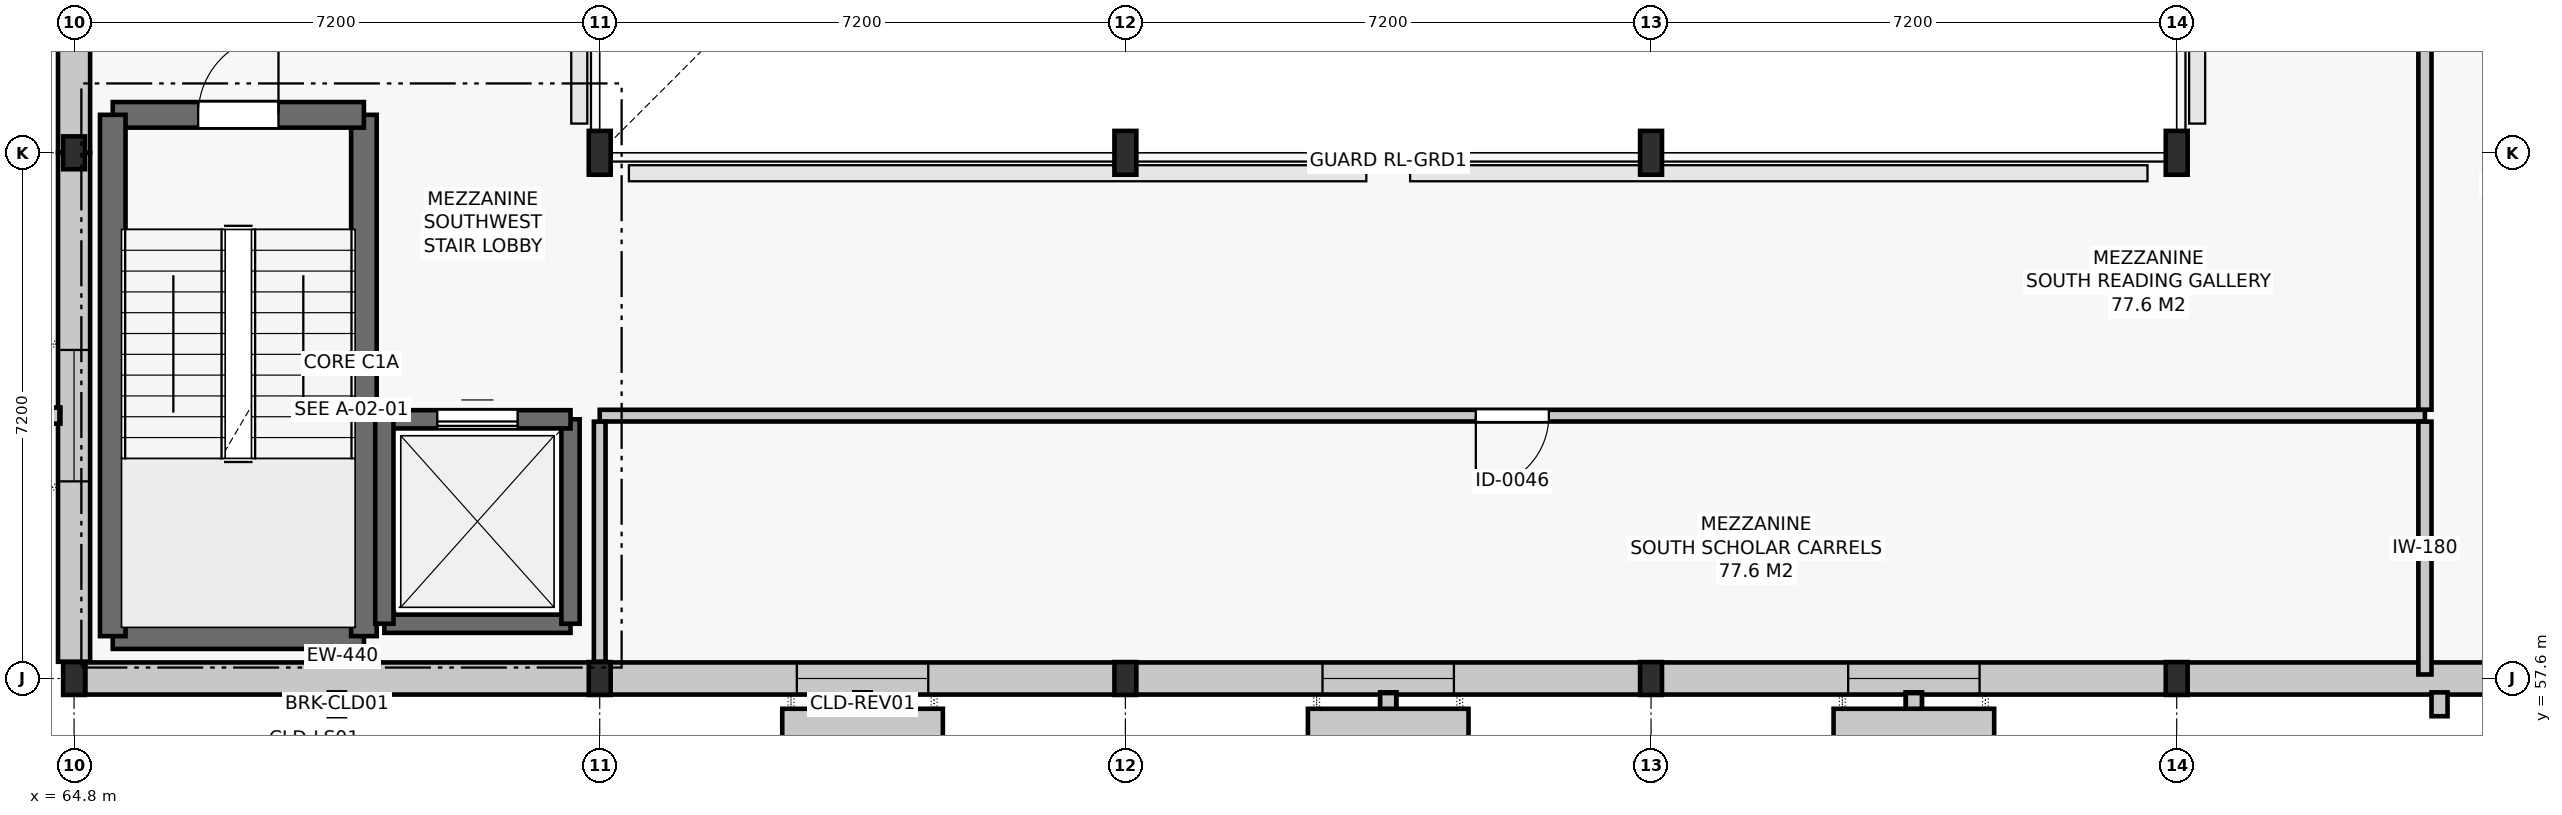
"""IFC4 building model, lengths in metres.
Left out: names, types, materials, properties, quantities, classifications, styles, units other than length and angle.
Written with IfcOpenShell. Run it as: python <this file> out.ifc"""

import sys

from ifc_helpers import new_model, si_unit, direction, frame, frame_2d, origin, origin_2d, place, context, subcontext, project, spatial, rectangle, i_section, extrude, element, fill, save


model = new_model("IFC4")
c1 = context("Model", 3, precision=1e-05, world=origin(), true_north=direction((0.0, 1.0)))
c2 = subcontext(c1, "Body", "Model", "MODEL_VIEW")
j1 = project(units=[si_unit("LENGTHUNIT", "METRE"), si_unit("PLANEANGLEUNIT", "RADIAN")], contexts=[c1])
p1 = place(None, origin())
s1 = spatial("IfcSite", under=j1, at=p1, CompositionType="ELEMENT")
p2 = place(p1, origin())
s2 = spatial("IfcBuilding", under=s1, at=p2, CompositionType="ELEMENT")
p3 = place(p2, frame((0.0, 0.0, 10.2)))
s3 = spatial("IfcBuildingStorey", under=s2, at=p3, CompositionType="ELEMENT", Elevation=10.2)
for number, where, z_axis, x_axis in (
    (1, (64.8, 57.6, 0.0), (0.0, 0.0, 1.0), (1.0, 0.0, 0.0)),
    (2, (64.8, 64.8, 0.0), (0.0, 0.0, 1.0), (1.0, 0.0, 0.0)),
    (3, (72.0, 57.6, 0.0), (0.0, 0.0, 1.0), (1.0, 0.0, 0.0)),
):
    element("IfcColumn", number, at=place(p3, frame(where, z_axis=z_axis, x_axis=x_axis)), inside=s3, PredefinedType="COLUMN", context=c2, shape_type="SweptSolid", body=[
        extrude(i_section(OverallWidth=0.3, OverallDepth=0.45, WebThickness=0.014, FlangeThickness=0.026, FilletRadius=0.027, at=origin_2d()), origin(), (0.0, 0.0, 1.0), 4.2),
    ])
p4 = place(p3, frame((72.0, 64.8, 0.0), z_axis=(0.0, 0.0, 1.0), x_axis=(1.0, 0.0, 0.0)))
e4 = element("IfcColumn", 4, at=p4, inside=s3, PredefinedType="COLUMN", context=c2, shape_type="SweptSolid", body=[
    extrude(i_section(OverallWidth=0.3, OverallDepth=0.6, WebThickness=0.015, FlangeThickness=0.03, FilletRadius=0.027, at=origin_2d()), origin(), (0.0, 0.0, 1.0), 4.2),
])
p5 = place(p3, frame((79.2, 57.6, 0.0), z_axis=(0.0, 0.0, 1.0), x_axis=(1.0, 0.0, 0.0)))
e5 = element("IfcColumn", 5, at=p5, inside=s3, PredefinedType="COLUMN", context=c2, shape_type="SweptSolid", body=[
    extrude(i_section(OverallWidth=0.3, OverallDepth=0.45, WebThickness=0.014, FlangeThickness=0.026, FilletRadius=0.027, at=origin_2d()), origin(), (0.0, 0.0, 1.0), 4.2),
])
p6 = place(p3, frame((79.2, 64.8, 0.0), z_axis=(0.0, 0.0, 1.0), x_axis=(1.0, 0.0, 0.0)))
e6 = element("IfcColumn", 6, at=p6, inside=s3, PredefinedType="COLUMN", context=c2, shape_type="SweptSolid", body=[
    extrude(i_section(OverallWidth=0.3, OverallDepth=0.6, WebThickness=0.015, FlangeThickness=0.03, FilletRadius=0.027, at=origin_2d()), origin(), (0.0, 0.0, 1.0), 4.2),
])
p7 = place(p3, frame((86.4, 57.6, 0.0), z_axis=(0.0, 0.0, 1.0), x_axis=(1.0, 0.0, 0.0)))
e7 = element("IfcColumn", 7, at=p7, inside=s3, PredefinedType="COLUMN", context=c2, shape_type="SweptSolid", body=[
    extrude(i_section(OverallWidth=0.3, OverallDepth=0.45, WebThickness=0.014, FlangeThickness=0.026, FilletRadius=0.027, at=origin_2d()), origin(), (0.0, 0.0, 1.0), 4.2),
])
p8 = place(p3, frame((86.4, 64.8, 0.0), z_axis=(0.0, 0.0, 1.0), x_axis=(1.0, 0.0, 0.0)))
e8 = element("IfcColumn", 8, at=p8, inside=s3, PredefinedType="COLUMN", context=c2, shape_type="SweptSolid", body=[
    extrude(i_section(OverallWidth=0.3, OverallDepth=0.6, WebThickness=0.015, FlangeThickness=0.03, FilletRadius=0.027, at=origin_2d()), origin(), (0.0, 0.0, 1.0), 4.2),
])
p9 = place(p3, frame((93.6, 57.6, 0.0), z_axis=(0.0, 0.0, 1.0), x_axis=(1.0, 0.0, 0.0)))
e9 = element("IfcColumn", 9, at=p9, inside=s3, PredefinedType="COLUMN", context=c2, shape_type="SweptSolid", body=[
    extrude(i_section(OverallWidth=0.3, OverallDepth=0.45, WebThickness=0.014, FlangeThickness=0.026, FilletRadius=0.027, at=origin_2d()), origin(), (0.0, 0.0, 1.0), 4.2),
])
p10 = place(p3, frame((93.6, 64.8, 0.0), z_axis=(0.0, 0.0, 1.0), x_axis=(1.0, 0.0, 0.0)))
e10 = element("IfcColumn", 10, at=p10, inside=s3, PredefinedType="COLUMN", context=c2, shape_type="SweptSolid", body=[
    extrude(i_section(OverallWidth=0.3, OverallDepth=0.6, WebThickness=0.015, FlangeThickness=0.03, FilletRadius=0.027, at=origin_2d()), origin(), (0.0, 0.0, 1.0), 4.2),
])
p11 = place(p3, frame((64.954, 57.6, 0.0), z_axis=(0.0, 0.0, 1.0), x_axis=(1.0, 0.0, 0.0)))
e11 = element("IfcWall", 11, at=p11, inside=s3, PredefinedType="SOLIDWALL", context=c2, shape_type="SweptSolid", body=[
    extrude(rectangle(XDim=7.046, YDim=0.44, at=frame_2d((3.523, 0.0))), origin(), (0.0, 0.0, 1.0), 3.2),
])
p12 = place(p3, frame((72.0, 57.6, 0.0), z_axis=(0.0, 0.0, 1.0), x_axis=(1.0, 0.0, 0.0)))
e12 = element("IfcWall", 12, at=p12, inside=s3, PredefinedType="SOLIDWALL", context=c2, shape_type="SweptSolid", body=[
    extrude(rectangle(XDim=7.2, YDim=0.44, at=frame_2d((3.6, 0.0))), origin(), (0.0, 0.0, 1.0), 3.2),
])
p13 = place(p12, frame((2.7, 0.0, 0.95)))
e13 = element("IfcOpeningElement", 13, at=p13, cuts=e12, PredefinedType="OPENING", context=c2, shape_type="SweptSolid", body=[
    extrude(rectangle(XDim=1.8, YDim=2.05, at=frame_2d((0.9, 1.025))), frame((0.0, 0.232, 0.0), z_axis=(0.0, -1.0, 0.0), x_axis=(1.0, 0.0, 0.0)), (0.0, 0.0, 1.0), 0.464),
])
p14 = place(p3, frame((79.2, 57.6, 0.0), z_axis=(0.0, 0.0, 1.0), x_axis=(1.0, 0.0, 0.0)))
e14 = element("IfcWall", 14, at=p14, inside=s3, PredefinedType="SOLIDWALL", context=c2, shape_type="SweptSolid", body=[
    extrude(rectangle(XDim=7.2, YDim=0.44, at=frame_2d((3.6, 0.0))), origin(), (0.0, 0.0, 1.0), 3.2),
])
p15 = place(p14, frame((2.7, 0.0, 0.95)))
e15 = element("IfcOpeningElement", 15, at=p15, cuts=e14, PredefinedType="OPENING", context=c2, shape_type="SweptSolid", body=[
    extrude(rectangle(XDim=1.8, YDim=2.05, at=frame_2d((0.9, 1.025))), frame((0.0, 0.232, 0.0), z_axis=(0.0, -1.0, 0.0), x_axis=(1.0, 0.0, 0.0)), (0.0, 0.0, 1.0), 0.464),
])
p16 = place(p3, frame((86.4, 57.6, 0.0), z_axis=(0.0, 0.0, 1.0), x_axis=(1.0, 0.0, 0.0)))
e16 = element("IfcWall", 16, at=p16, inside=s3, PredefinedType="SOLIDWALL", context=c2, shape_type="SweptSolid", body=[
    extrude(rectangle(XDim=7.2, YDim=0.44, at=frame_2d((3.6, 0.0))), origin(), (0.0, 0.0, 1.0), 3.2),
])
p17 = place(p16, frame((2.7, 0.0, 0.95)))
e17 = element("IfcOpeningElement", 17, at=p17, cuts=e16, PredefinedType="OPENING", context=c2, shape_type="SweptSolid", body=[
    extrude(rectangle(XDim=1.8, YDim=2.05, at=frame_2d((0.9, 1.025))), frame((0.0, 0.232, 0.0), z_axis=(0.0, -1.0, 0.0), x_axis=(1.0, 0.0, 0.0)), (0.0, 0.0, 1.0), 0.464),
])
p18 = place(p3, frame((93.6, 57.6, 0.0), z_axis=(0.0, 0.0, 1.0), x_axis=(1.0, 0.0, 0.0)))
e18 = element("IfcWall", 18, at=p18, inside=s3, PredefinedType="SOLIDWALL", context=c2, shape_type="SweptSolid", body=[
    extrude(rectangle(XDim=7.046, YDim=0.44, at=frame_2d((3.523, 0.0))), origin(), (0.0, 0.0, 1.0), 3.2),
])
p19 = place(p3, frame((64.8, 72.0, 0.0), z_axis=(0.0, 0.0, 1.0), x_axis=(0.0, -1.0, 0.0)))
e19 = element("IfcWall", 19, at=p19, inside=s3, PredefinedType="SOLIDWALL", context=c2, shape_type="SweptSolid", body=[
    extrude(rectangle(XDim=7.2, YDim=0.44, at=frame_2d((3.6, 0.0))), origin(), (0.0, 0.0, 1.0), 3.2),
])
p20 = place(p19, frame((2.7, 0.0, 0.95)))
e20 = element("IfcOpeningElement", 20, at=p20, cuts=e19, PredefinedType="OPENING", context=c2, shape_type="SweptSolid", body=[
    extrude(rectangle(XDim=1.8, YDim=2.05, at=frame_2d((0.9, 1.025))), frame((0.0, 0.232, 0.0), z_axis=(0.0, -1.0, 0.0), x_axis=(1.0, 0.0, 0.0)), (0.0, 0.0, 1.0), 0.464),
])
p21 = place(p3, frame((64.8, 64.8, 0.0), z_axis=(0.0, 0.0, 1.0), x_axis=(0.0, -1.0, 0.0)))
e21 = element("IfcWall", 21, at=p21, inside=s3, PredefinedType="SOLIDWALL", context=c2, shape_type="SweptSolid", body=[
    extrude(rectangle(XDim=6.971, YDim=0.44, at=frame_2d((3.485, 0.0))), origin(), (0.0, 0.0, 1.0), 3.2),
])
p22 = place(p21, frame((2.7, 0.0, 0.95)))
e22 = element("IfcOpeningElement", 22, at=p22, cuts=e21, PredefinedType="OPENING", context=c2, shape_type="SweptSolid", body=[
    extrude(rectangle(XDim=1.8, YDim=2.05, at=frame_2d((0.9, 1.025))), frame((0.0, 0.232, 0.0), z_axis=(0.0, -1.0, 0.0), x_axis=(1.0, 0.0, 0.0)), (0.0, 0.0, 1.0), 0.464),
])
p23 = place(p3, frame((65.33, 58.18, 0.0), z_axis=(0.0, 0.0, 1.0), x_axis=(1.0, 0.0, 0.0)))
e23 = element("IfcWall", 23, at=p23, inside=s3, PredefinedType="SHEAR", context=c2, shape_type="SweptSolid", body=[
    extrude(rectangle(XDim=3.44, YDim=0.35, at=frame_2d((1.72, 0.0))), origin(), (0.0, 0.0, 1.0), 3.92),
])
p24 = place(p3, frame((68.77, 58.18, 0.0), z_axis=(0.0, 0.0, 1.0), x_axis=(0.0, 1.0, 0.0)))
e24 = element("IfcWall", 24, at=p24, inside=s3, PredefinedType="SHEAR", context=c2, shape_type="SweptSolid", body=[
    extrude(rectangle(XDim=7.14, YDim=0.35, at=frame_2d((3.57, 0.0))), origin(), (0.0, 0.0, 1.0), 3.92),
])
p25 = place(p3, frame((68.77, 65.32, 0.0), z_axis=(0.0, 0.0, 1.0), x_axis=(-1.0, 0.0, 0.0)))
e25 = element("IfcWall", 25, at=p25, inside=s3, PredefinedType="SHEAR", context=c2, shape_type="SweptSolid", body=[
    extrude(rectangle(XDim=3.44, YDim=0.35, at=frame_2d((1.72, 0.0))), origin(), (0.0, 0.0, 1.0), 3.92),
])
p26 = place(p25, frame((1.17, 0.0, 0.0)))
e26 = element("IfcOpeningElement", 26, at=p26, cuts=e25, PredefinedType="OPENING", context=c2, shape_type="SweptSolid", body=[
    extrude(rectangle(XDim=1.1, YDim=2.15, at=frame_2d((0.55, 1.075))), frame((0.0, 0.187, 0.0), z_axis=(0.0, -1.0, 0.0), x_axis=(1.0, 0.0, 0.0)), (0.0, 0.0, 1.0), 0.374),
])
p27 = place(p3, frame((65.33, 65.32, 0.0), z_axis=(0.0, 0.0, 1.0), x_axis=(0.0, -1.0, 0.0)))
e27 = element("IfcWall", 27, at=p27, inside=s3, PredefinedType="SHEAR", context=c2, shape_type="SweptSolid", body=[
    extrude(rectangle(XDim=7.14, YDim=0.35, at=frame_2d((3.57, 0.0))), origin(), (0.0, 0.0, 1.0), 3.92),
])
p28 = place(p3, frame((69.05, 58.35, 0.0), z_axis=(0.0, 0.0, 1.0), x_axis=(1.0, 0.0, 0.0)))
e28 = element("IfcWall", 28, at=p28, inside=s3, PredefinedType="SHEAR", context=c2, shape_type="SweptSolid", body=[
    extrude(rectangle(XDim=2.55, YDim=0.25, at=frame_2d((1.275, 0.0))), origin(), (0.0, 0.0, 1.0), 3.92),
])
p29 = place(p3, frame((71.6, 58.35, 0.0), z_axis=(0.0, 0.0, 1.0), x_axis=(0.0, 1.0, 0.0)))
e29 = element("IfcWall", 29, at=p29, inside=s3, PredefinedType="SHEAR", context=c2, shape_type="SweptSolid", body=[
    extrude(rectangle(XDim=2.8, YDim=0.25, at=frame_2d((1.4, 0.0))), origin(), (0.0, 0.0, 1.0), 3.92),
])
p30 = place(p3, frame((71.6, 61.15, 0.0), z_axis=(0.0, 0.0, 1.0), x_axis=(-1.0, 0.0, 0.0)))
e30 = element("IfcWall", 30, at=p30, inside=s3, PredefinedType="SHEAR", context=c2, shape_type="SweptSolid", body=[
    extrude(rectangle(XDim=2.55, YDim=0.25, at=frame_2d((1.275, 0.0))), origin(), (0.0, 0.0, 1.0), 3.92),
])
p31 = place(p30, frame((0.725, 0.0, 0.0)))
e31 = element("IfcOpeningElement", 31, at=p31, cuts=e30, PredefinedType="OPENING", context=c2, shape_type="SweptSolid", body=[
    extrude(rectangle(XDim=1.1, YDim=2.1, at=frame_2d((0.55, 1.05))), frame((0.0, 0.137, 0.0), z_axis=(0.0, -1.0, 0.0), x_axis=(1.0, 0.0, 0.0)), (0.0, 0.0, 1.0), 0.274),
])
p32 = place(p3, frame((69.05, 61.15, 0.0), z_axis=(0.0, 0.0, 1.0), x_axis=(0.0, -1.0, 0.0)))
e32 = element("IfcWall", 32, at=p32, inside=s3, PredefinedType="SHEAR", context=c2, shape_type="SweptSolid", body=[
    extrude(rectangle(XDim=2.8, YDim=0.25, at=frame_2d((1.4, 0.0))), origin(), (0.0, 0.0, 1.0), 3.92),
])
p33 = place(p3, frame((72.0, 61.2, 0.0), z_axis=(0.0, 0.0, 1.0), x_axis=(1.0, 0.0, 0.0)))
e33 = element("IfcWall", 33, at=p33, inside=s3, PredefinedType="PARTITIONING", context=c2, shape_type="SweptSolid", body=[
    extrude(rectangle(XDim=25.0, YDim=0.16, at=frame_2d((12.5, 0.0))), origin(), (0.0, 0.0, 1.0), 3.541),
])
p34 = place(p33, frame((12.0, 0.0, 0.0)))
e34 = element("IfcOpeningElement", 34, at=p34, cuts=e33, PredefinedType="OPENING", context=c2, shape_type="SweptSolid", body=[
    extrude(rectangle(XDim=1.0, YDim=2.15, at=frame_2d((0.5, 1.075))), frame((0.0, 0.092, 0.0), z_axis=(0.0, -1.0, 0.0), x_axis=(1.0, 0.0, 0.0)), (0.0, 0.0, 1.0), 0.184),
])
p35 = place(p3, frame((97.0, 57.655, 0.0), z_axis=(0.0, 0.0, 1.0), x_axis=(0.0, 1.0, 0.0)))
e35 = element("IfcWall", 35, at=p35, inside=s3, PredefinedType="PARTITIONING", context=c2, shape_type="SweptSolid", body=[
    extrude(rectangle(XDim=3.463, YDim=0.18, at=frame_2d((1.731, 0.0))), origin(), (0.0, 0.0, 1.0), 3.355),
])
p36 = place(p3, frame((97.0, 61.282, 0.0), z_axis=(0.0, 0.0, 1.0), x_axis=(0.0, 1.0, 0.0)))
e36 = element("IfcWall", 36, at=p36, inside=s3, PredefinedType="PARTITIONING", context=c2, shape_type="SweptSolid", body=[
    extrude(rectangle(XDim=17.826, YDim=0.18, at=frame_2d((8.913, 0.0))), origin(), (0.0, 0.0, 1.0), 3.545),
])
p37 = place(p36, frame((9.727, 0.0, 0.0)))
e37 = element("IfcOpeningElement", 37, at=p37, cuts=e36, PredefinedType="OPENING", context=c2, shape_type="SweptSolid", body=[
    extrude(rectangle(XDim=1.65, YDim=2.25, at=frame_2d((0.825, 1.125))), frame((0.0, 0.102, 0.0), z_axis=(0.0, -1.0, 0.0), x_axis=(1.0, 0.0, 0.0)), (0.0, 0.0, 1.0), 0.204),
])
p38 = place(p3, frame((72.0, 57.829, 0.0), z_axis=(0.0, 0.0, 1.0), x_axis=(0.0, 1.0, 0.0)))
e38 = element("IfcWall", 38, at=p38, inside=s3, PredefinedType="PARTITIONING", context=c2, shape_type="SweptSolid", body=[
    extrude(rectangle(XDim=3.289, YDim=0.16, at=frame_2d((1.645, 0.0))), origin(), (0.0, 0.0, 1.0), 3.555),
])
p39 = place(p13, origin())
e39 = element("IfcWindow", 39, at=p39, inside=s3, PartitioningType="SINGLE_PANEL", PredefinedType="WINDOW", context=c2, shape_type="SweptSolid", body=[
    extrude(rectangle(XDim=1.8, YDim=2.05, at=frame_2d((0.9, 1.025))), frame((0.0, 0.03, 0.0), z_axis=(0.0, -1.0, 0.0), x_axis=(1.0, 0.0, 0.0)), (0.0, 0.0, 1.0), 0.06),
])
fill(e13, e39)
p40 = place(p15, origin())
e40 = element("IfcWindow", 40, at=p40, inside=s3, PartitioningType="SINGLE_PANEL", PredefinedType="WINDOW", context=c2, shape_type="SweptSolid", body=[
    extrude(rectangle(XDim=1.8, YDim=2.05, at=frame_2d((0.9, 1.025))), frame((0.0, 0.03, 0.0), z_axis=(0.0, -1.0, 0.0), x_axis=(1.0, 0.0, 0.0)), (0.0, 0.0, 1.0), 0.06),
])
fill(e15, e40)
p41 = place(p17, origin())
e41 = element("IfcWindow", 41, at=p41, inside=s3, PartitioningType="SINGLE_PANEL", PredefinedType="WINDOW", context=c2, shape_type="SweptSolid", body=[
    extrude(rectangle(XDim=1.8, YDim=2.05, at=frame_2d((0.9, 1.025))), frame((0.0, 0.03, 0.0), z_axis=(0.0, -1.0, 0.0), x_axis=(1.0, 0.0, 0.0)), (0.0, 0.0, 1.0), 0.06),
])
fill(e17, e41)
p42 = place(p22, origin())
e42 = element("IfcWindow", 42, at=p42, inside=s3, PartitioningType="SINGLE_PANEL", PredefinedType="WINDOW", context=c2, shape_type="SweptSolid", body=[
    extrude(rectangle(XDim=1.8, YDim=2.05, at=frame_2d((0.9, 1.025))), frame((0.0, 0.03, 0.0), z_axis=(0.0, -1.0, 0.0), x_axis=(1.0, 0.0, 0.0)), (0.0, 0.0, 1.0), 0.06),
])
fill(e22, e42)
p43 = place(p26, frame((1.1, 0.0, 0.0), z_axis=(0.0, 0.0, 1.0), x_axis=(-1.0, 0.0, 0.0)))
e43 = element("IfcDoor", 43, at=p43, inside=s3, OperationType="SINGLE_SWING_RIGHT", PredefinedType="DOOR", context=c2, shape_type="SweptSolid", body=[
    extrude(rectangle(XDim=1.1, YDim=2.15, at=frame_2d((0.55, 1.075))), frame((0.0, 0.025, 0.0), z_axis=(0.0, -1.0, 0.0), x_axis=(1.0, 0.0, 0.0)), (0.0, 0.0, 1.0), 0.05),
])
fill(e26, e43)
p44 = place(p31, origin())
e44 = element("IfcDoor", 44, at=p44, inside=s3, OperationType="SLIDING_TO_LEFT", PredefinedType="DOOR", context=c2, shape_type="SweptSolid", body=[
    extrude(rectangle(XDim=1.1, YDim=2.1, at=frame_2d((0.55, 1.05))), frame((0.0, 0.025, 0.0), z_axis=(0.0, -1.0, 0.0), x_axis=(1.0, 0.0, 0.0)), (0.0, 0.0, 1.0), 0.05),
])
fill(e31, e44)
p45 = place(p34, frame((1.0, 0.0, 0.0), z_axis=(0.0, 0.0, 1.0), x_axis=(-1.0, 0.0, 0.0)))
e45 = element("IfcDoor", 45, at=p45, inside=s3, OperationType="SINGLE_SWING_RIGHT", PredefinedType="DOOR", context=c2, shape_type="SweptSolid", body=[
    extrude(rectangle(XDim=1.0, YDim=2.15, at=frame_2d((0.5, 1.075))), frame((0.0, 0.025, 0.0), z_axis=(0.0, -1.0, 0.0), x_axis=(1.0, 0.0, 0.0)), (0.0, 0.0, 1.0), 0.05),
])
fill(e34, e45)
save(model, sys.argv[1])
